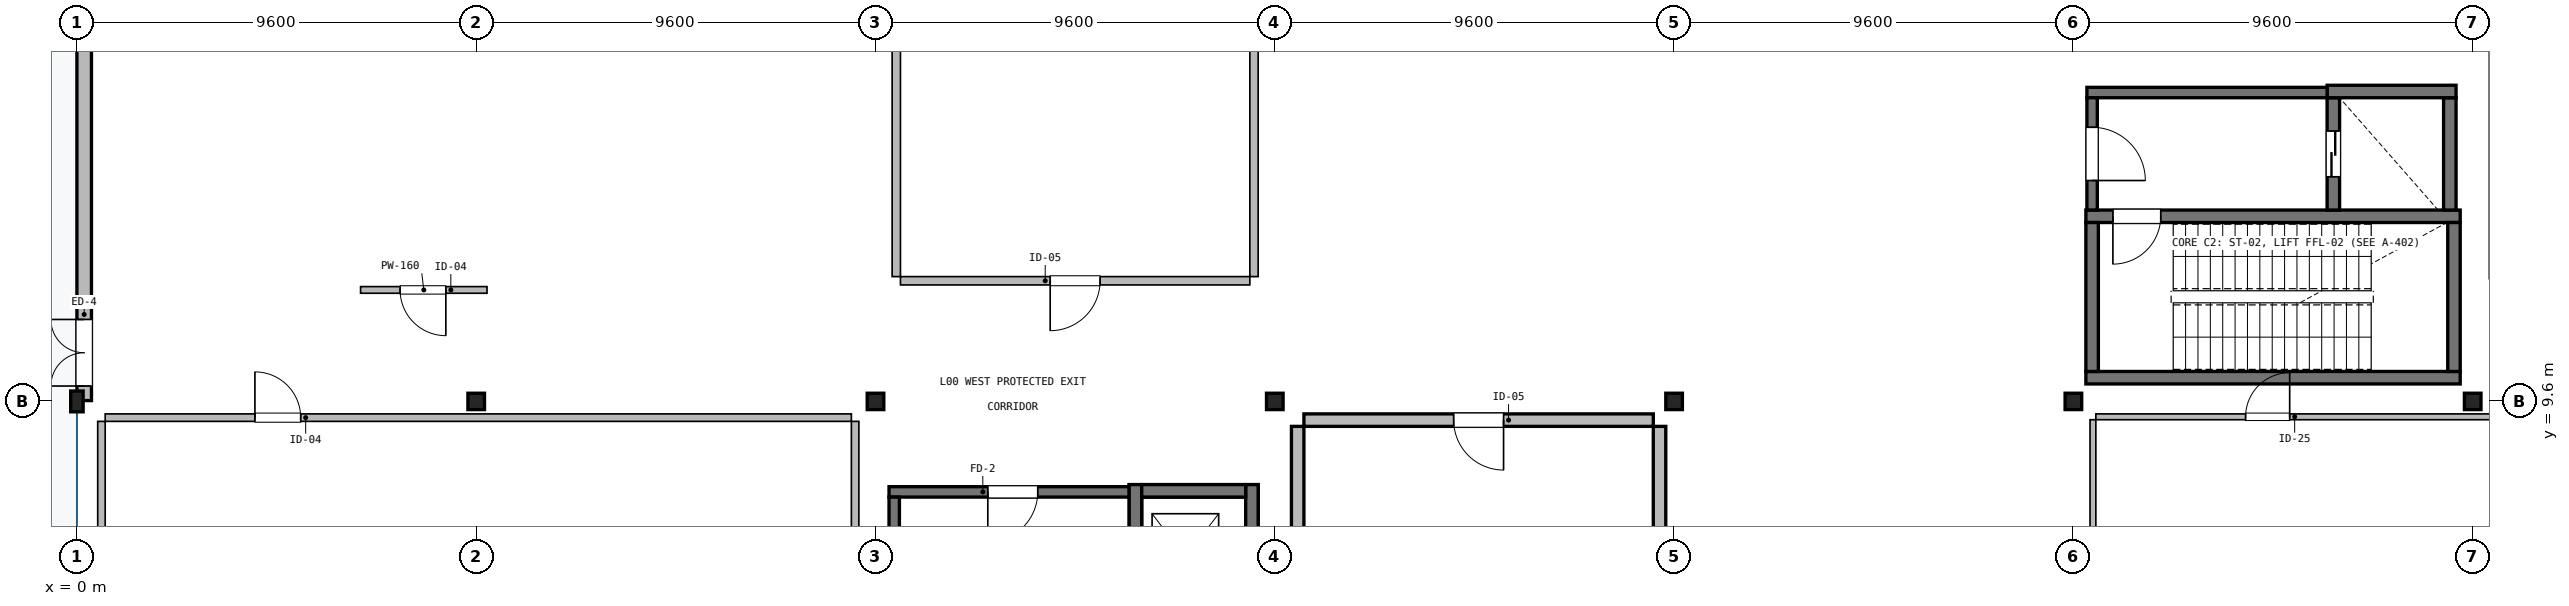
"""IFC4 building model, lengths in metres.
Left out: names, types, materials, properties, quantities, classifications, styles, units other than length and angle.
Written with IfcOpenShell. Run it as: python <this file> out.ifc"""

import sys

from ifc_helpers import new_model, si_unit, direction, frame, frame_2d, origin, origin_2d, place, context, subcontext, project, spatial, rectangle, i_section, extrude, element, fill, save


model = new_model("IFC4")
c1 = context("Model", 3, precision=1e-05, world=origin(), true_north=direction((0.0, 1.0)))
c2 = subcontext(c1, "Body", "Model", "MODEL_VIEW")
j1 = project(units=[si_unit("LENGTHUNIT", "METRE"), si_unit("PLANEANGLEUNIT", "RADIAN")], contexts=[c1])
p1 = place(None, origin())
s1 = spatial("IfcSite", under=j1, at=p1, CompositionType="ELEMENT")
p2 = place(p1, origin())
s2 = spatial("IfcBuilding", under=s1, at=p2, CompositionType="ELEMENT")
p3 = place(p2, origin())
s3 = spatial("IfcBuildingStorey", under=s2, at=p3, CompositionType="ELEMENT", Elevation=0.0)
p4 = place(p3, frame((0.0, 9.6, -0.36), z_axis=(0.0, 0.0, 1.0), x_axis=(1.0, 0.0, 0.0)))
e1 = element("IfcColumn", 1, at=p4, inside=s3, PredefinedType="COLUMN", context=c2, shape_type="SweptSolid", body=[
    extrude(i_section(OverallWidth=0.3, OverallDepth=0.5, WebThickness=0.014, FlangeThickness=0.028, FilletRadius=0.027, at=origin_2d()), origin(), (0.0, 0.0, 1.0), 6.11),
])
for number, where, z_axis, x_axis in (
    (2, (9.6, 9.6, -0.36), (0.0, 0.0, 1.0), (1.0, 0.0, 0.0)),
    (3, (19.2, 9.6, -0.36), (0.0, 0.0, 1.0), (1.0, 0.0, 0.0)),
    (4, (28.8, 9.6, -0.36), (0.0, 0.0, 1.0), (1.0, 0.0, 0.0)),
    (5, (38.4, 9.6, -0.36), (0.0, 0.0, 1.0), (1.0, 0.0, 0.0)),
):
    element("IfcColumn", number, at=place(p3, frame(where, z_axis=z_axis, x_axis=x_axis)), inside=s3, PredefinedType="COLUMN", context=c2, shape_type="SweptSolid", body=[
        extrude(i_section(OverallWidth=0.399, OverallDepth=0.394, WebThickness=0.023, FlangeThickness=0.037, FilletRadius=0.015, at=origin_2d()), origin(), (0.0, 0.0, 1.0), 6.11),
    ])
for number, where, z_axis, x_axis in (
    (6, (48.0, 9.6, 0.0), (0.0, 0.0, 1.0), (1.0, 0.0, 0.0)),
    (7, (57.6, 9.6, 0.0), (0.0, 0.0, 1.0), (1.0, 0.0, 0.0)),
):
    element("IfcColumn", number, at=place(p3, frame(where, z_axis=z_axis, x_axis=x_axis)), inside=s3, PredefinedType="COLUMN", context=c2, shape_type="SweptSolid", body=[
        extrude(i_section(OverallWidth=0.399, OverallDepth=0.394, WebThickness=0.023, FlangeThickness=0.037, FilletRadius=0.015, at=origin_2d()), origin(), (0.0, 0.0, 1.0), 5.75),
    ])
p5 = place(p3, frame((48.3, 10.17, 0.0), z_axis=(0.0, 0.0, 1.0), x_axis=(1.0, 0.0, 0.0)))
e8 = element("IfcWall", 8, at=p5, inside=s3, PredefinedType="SHEAR", context=c2, shape_type="SweptSolid", body=[
    extrude(rectangle(XDim=9.0, YDim=0.3, at=frame_2d((4.5, 0.0))), origin(), (0.0, 0.0, 1.0), 5.75),
])
p6 = place(p3, frame((57.3, 14.05, 0.0), z_axis=(0.0, 0.0, 1.0), x_axis=(-1.0, 0.0, 0.0)))
e9 = element("IfcWall", 9, at=p6, inside=s3, PredefinedType="SHEAR", context=c2, shape_type="SweptSolid", body=[
    extrude(rectangle(XDim=9.0, YDim=0.3, at=frame_2d((4.5, 0.0))), origin(), (0.0, 0.0, 1.0), 5.75),
])
p7 = place(p6, frame((7.2, 0.0, 0.0)))
e10 = element("IfcOpeningElement", 10, at=p7, cuts=e9, PredefinedType="OPENING", context=c2, shape_type="SweptSolid", body=[
    extrude(rectangle(XDim=1.15, YDim=2.15, at=frame_2d((0.575, 1.075))), frame((0.0, 0.16, 0.0), z_axis=(0.0, -1.0, 0.0), x_axis=(1.0, 0.0, 0.0)), (0.0, 0.0, 1.0), 0.32),
])
for number, where, z_axis, x_axis in (
    (11, (48.45, 10.32, 0.0), (0.0, 0.0, 1.0), (0.0, 1.0, 0.0)),
    (12, (57.15, 13.9, 0.0), (0.0, 0.0, 1.0), (0.0, -1.0, 0.0)),
):
    element("IfcWall", number, at=place(p3, frame(where, z_axis=z_axis, x_axis=x_axis)), inside=s3, PredefinedType="SHEAR", context=c2, shape_type="SweptSolid", body=[
        extrude(rectangle(XDim=3.58, YDim=0.3, at=frame_2d((1.79, 0.0))), origin(), (0.0, 0.0, 1.0), 5.75),
    ])
p8 = place(p3, frame((54.25, 16.9, 0.0), z_axis=(0.0, 0.0, 1.0), x_axis=(0.0, -1.0, 0.0)))
e13 = element("IfcWall", 13, at=p8, inside=s3, PredefinedType="SHEAR", context=c2, shape_type="SweptSolid", body=[
    extrude(rectangle(XDim=2.7, YDim=0.3, at=frame_2d((1.35, 0.0))), origin(), (0.0, 0.0, 1.0), 5.75),
])
p9 = place(p8, frame((0.8, 0.0, 0.0)))
e14 = element("IfcOpeningElement", 14, at=p9, cuts=e13, PredefinedType="OPENING", context=c2, shape_type="SweptSolid", body=[
    extrude(rectangle(XDim=1.1, YDim=2.1, at=frame_2d((0.55, 1.05))), frame((0.0, 0.16, 0.0), z_axis=(0.0, -1.0, 0.0), x_axis=(1.0, 0.0, 0.0)), (0.0, 0.0, 1.0), 0.32),
])
p10 = place(p3, frame((57.05, 14.2, 0.0), z_axis=(0.0, 0.0, 1.0), x_axis=(0.0, 1.0, 0.0)))
e15 = element("IfcWall", 15, at=p10, inside=s3, PredefinedType="SHEAR", context=c2, shape_type="SweptSolid", body=[
    extrude(rectangle(XDim=2.7, YDim=0.3, at=frame_2d((1.35, 0.0))), origin(), (0.0, 0.0, 1.0), 5.75),
])
p11 = place(p3, frame((54.1, 17.05, 0.0), z_axis=(0.0, 0.0, 1.0), x_axis=(1.0, 0.0, 0.0)))
e16 = element("IfcWall", 16, at=p11, inside=s3, PredefinedType="SHEAR", context=c2, shape_type="SweptSolid", body=[
    extrude(rectangle(XDim=3.1, YDim=0.3, at=frame_2d((1.55, 0.0))), origin(), (0.0, 0.0, 1.0), 5.75),
])
p12 = place(p3, frame((54.1, 17.025, 0.0), z_axis=(0.0, 0.0, 1.0), x_axis=(-1.0, 0.0, 0.0)))
e17 = element("IfcWall", 17, at=p12, inside=s3, PredefinedType="SHEAR", context=c2, shape_type="SweptSolid", body=[
    extrude(rectangle(XDim=5.775, YDim=0.25, at=frame_2d((2.888, 0.0))), origin(), (0.0, 0.0, 1.0), 5.75),
])
p13 = place(p3, frame((48.45, 14.2, 0.0), z_axis=(0.0, 0.0, 1.0), x_axis=(0.0, 1.0, 0.0)))
e18 = element("IfcWall", 18, at=p13, inside=s3, PredefinedType="SHEAR", context=c2, shape_type="SweptSolid", body=[
    extrude(rectangle(XDim=2.7, YDim=0.25, at=frame_2d((1.35, 0.0))), origin(), (0.0, 0.0, 1.0), 5.75),
])
p14 = place(p13, frame((0.71, 0.0, 0.0)))
e19 = element("IfcOpeningElement", 19, at=p14, cuts=e18, PredefinedType="OPENING", context=c2, shape_type="SweptSolid", body=[
    extrude(rectangle(XDim=1.28, YDim=2.2, at=frame_2d((0.64, 1.1))), frame((0.0, 0.135, 0.0), z_axis=(0.0, -1.0, 0.0), x_axis=(1.0, 0.0, 0.0)), (0.0, 0.0, 1.0), 0.27),
])
p15 = place(p3, frame((25.45, 7.3, 0.0), z_axis=(0.0, 0.0, 1.0), x_axis=(0.0, -1.0, 0.0)))
e20 = element("IfcWall", 20, at=p15, inside=s3, PredefinedType="SHEAR", context=c2, shape_type="SweptSolid", body=[
    extrude(rectangle(XDim=2.7, YDim=0.3, at=frame_2d((1.35, 0.0))), origin(), (0.0, 0.0, 1.0), 5.75),
])
p16 = place(p15, frame((0.775, 0.0, 0.0)))
e21 = element("IfcOpeningElement", 21, at=p16, cuts=e20, PredefinedType="OPENING", context=c2, shape_type="SweptSolid", body=[
    extrude(rectangle(XDim=1.15, YDim=2.1, at=frame_2d((0.575, 1.05))), frame((0.0, 0.16, 0.0), z_axis=(0.0, -1.0, 0.0), x_axis=(1.0, 0.0, 0.0)), (0.0, 0.0, 1.0), 0.32),
])
p17 = place(p3, frame((28.25, 4.6, 0.0), z_axis=(0.0, 0.0, 1.0), x_axis=(0.0, 1.0, 0.0)))
e22 = element("IfcWall", 22, at=p17, inside=s3, PredefinedType="SHEAR", context=c2, shape_type="SweptSolid", body=[
    extrude(rectangle(XDim=2.7, YDim=0.3, at=frame_2d((1.35, 0.0))), origin(), (0.0, 0.0, 1.0), 5.75),
])
p18 = place(p3, frame((25.3, 7.45, 0.0), z_axis=(0.0, 0.0, 1.0), x_axis=(1.0, 0.0, 0.0)))
e23 = element("IfcWall", 23, at=p18, inside=s3, PredefinedType="SHEAR", context=c2, shape_type="SweptSolid", body=[
    extrude(rectangle(XDim=3.1, YDim=0.3, at=frame_2d((1.55, 0.0))), origin(), (0.0, 0.0, 1.0), 5.75),
])
p19 = place(p3, frame((25.3, 7.425, 0.0), z_axis=(0.0, 0.0, 1.0), x_axis=(-1.0, 0.0, 0.0)))
e24 = element("IfcWall", 24, at=p19, inside=s3, PredefinedType="SHEAR", context=c2, shape_type="SweptSolid", body=[
    extrude(rectangle(XDim=5.775, YDim=0.25, at=frame_2d((2.888, 0.0))), origin(), (0.0, 0.0, 1.0), 5.75),
])
p20 = place(p19, frame((2.2, 0.0, 0.0)))
e25 = element("IfcOpeningElement", 25, at=p20, cuts=e24, PredefinedType="OPENING", context=c2, shape_type="SweptSolid", body=[
    extrude(rectangle(XDim=1.2, YDim=2.15, at=frame_2d((0.6, 1.075))), frame((0.0, 0.135, 0.0), z_axis=(0.0, -1.0, 0.0), x_axis=(1.0, 0.0, 0.0)), (0.0, 0.0, 1.0), 0.27),
])
p21 = place(p3, frame((19.65, 4.6, 0.0), z_axis=(0.0, 0.0, 1.0), x_axis=(0.0, 1.0, 0.0)))
e26 = element("IfcWall", 26, at=p21, inside=s3, PredefinedType="SHEAR", context=c2, shape_type="SweptSolid", body=[
    extrude(rectangle(XDim=2.7, YDim=0.25, at=frame_2d((1.35, 0.0))), origin(), (0.0, 0.0, 1.0), 5.75),
])
for number, where, z_axis, x_axis in (
    (27, (25.45, 4.3, -1.2), (0.0, 0.0, 1.0), (0.0, 1.0, 0.0)),
    (28, (28.25, 4.3, -1.2), (0.0, 0.0, 1.0), (0.0, 1.0, 0.0)),
):
    element("IfcWall", number, at=place(p3, frame(where, z_axis=z_axis, x_axis=x_axis)), inside=s3, PredefinedType="SHEAR", context=c2, shape_type="SweptSolid", body=[
        extrude(rectangle(XDim=3.3, YDim=0.3, at=frame_2d((1.65, 0.0))), origin(), (0.0, 0.0, 1.0), 0.82),
    ])
p22 = place(p3, frame((25.6, 7.45, -1.2), z_axis=(0.0, 0.0, 1.0), x_axis=(1.0, 0.0, 0.0)))
e29 = element("IfcWall", 29, at=p22, inside=s3, PredefinedType="SHEAR", context=c2, shape_type="SweptSolid", body=[
    extrude(rectangle(XDim=2.5, YDim=0.3, at=frame_2d((1.25, 0.0))), origin(), (0.0, 0.0, 1.0), 0.82),
])
p23 = place(p3, frame((0.175, 9.62, 0.0), z_axis=(0.0, 0.0, 1.0), x_axis=(0.0, 1.0, 0.0)))
e30 = element("IfcWall", 30, at=p23, inside=s3, PredefinedType="SOLIDWALL", context=c2, shape_type="SweptSolid", body=[
    extrude(rectangle(XDim=9.56, YDim=0.35, at=frame_2d((4.78, 0.0))), origin(), (0.0, 0.0, 1.0), 5.217),
])
p24 = place(p23, frame((0.35, 0.0, 0.0)))
e31 = element("IfcOpeningElement", 31, at=p24, cuts=e30, PredefinedType="OPENING", context=c2, shape_type="SweptSolid", body=[
    extrude(rectangle(XDim=1.6, YDim=2.2, at=frame_2d((0.8, 1.1))), frame((0.0, 0.185, 0.0), z_axis=(0.0, -1.0, 0.0), x_axis=(1.0, 0.0, 0.0)), (0.0, 0.0, 1.0), 0.37),
])
p25 = place(p3, frame((6.82, 12.28, 0.0), z_axis=(0.0, 0.0, 1.0), x_axis=(1.0, 0.0, 0.0)))
e32 = element("IfcWall", 32, at=p25, inside=s3, PredefinedType="PARTITIONING", context=c2, shape_type="SweptSolid", body=[
    extrude(rectangle(XDim=3.04, YDim=0.16, at=frame_2d((1.52, 0.0))), origin(), (0.0, 0.0, 1.0), 5.207),
])
p26 = place(p25, frame((0.95, 0.0, 0.0)))
e33 = element("IfcOpeningElement", 33, at=p26, cuts=e32, PredefinedType="OPENING", context=c2, shape_type="SweptSolid", body=[
    extrude(rectangle(XDim=1.1, YDim=2.2, at=frame_2d((0.55, 1.1))), frame((0.0, 0.09, 0.0), z_axis=(0.0, -1.0, 0.0), x_axis=(1.0, 0.0, 0.0)), (0.0, 0.0, 1.0), 0.18),
])
p27 = place(p3, frame((29.5, 9.15, 0.0), z_axis=(0.0, 0.0, 1.0), x_axis=(1.0, 0.0, 0.0)))
e34 = element("IfcWall", 34, at=p27, inside=s3, PredefinedType="SHEAR", context=c2, shape_type="SweptSolid", body=[
    extrude(rectangle(XDim=8.4, YDim=0.3, at=frame_2d((4.2, 0.0))), origin(), (0.0, 0.0, 1.0), 5.39),
])
p28 = place(p27, frame((3.6, 0.0, 0.0)))
e35 = element("IfcOpeningElement", 35, at=p28, cuts=e34, PredefinedType="OPENING", context=c2, shape_type="SweptSolid", body=[
    extrude(rectangle(XDim=1.2, YDim=2.2, at=frame_2d((0.6, 1.1))), frame((0.0, 0.16, 0.0), z_axis=(0.0, -1.0, 0.0), x_axis=(1.0, 0.0, 0.0)), (0.0, 0.0, 1.0), 0.32),
])
for number, where, z_axis, x_axis in (
    (36, (29.35, 0.8, 0.0), (0.0, 0.0, 1.0), (0.0, 1.0, 0.0)),
    (37, (38.05, 9.0, 0.0), (0.0, 0.0, 1.0), (0.0, -1.0, 0.0)),
):
    element("IfcWall", number, at=place(p3, frame(where, z_axis=z_axis, x_axis=x_axis)), inside=s3, PredefinedType="SHEAR", context=c2, shape_type="SweptSolid", body=[
        extrude(rectangle(XDim=8.2, YDim=0.3, at=frame_2d((4.1, 0.0))), origin(), (0.0, 0.0, 1.0), 5.39),
    ])
p29 = place(p3, frame((0.68, 9.21, 0.0), z_axis=(0.0, 0.0, 1.0), x_axis=(1.0, 0.0, 0.0)))
e38 = element("IfcWall", 38, at=p29, inside=s3, PredefinedType="PARTITIONING", context=c2, shape_type="SweptSolid", body=[
    extrude(rectangle(XDim=17.94, YDim=0.18, at=frame_2d((8.97, 0.0))), origin(), (0.0, 0.0, 1.0), 5.207),
])
p30 = place(p29, frame((3.6, 0.0, 0.0)))
e39 = element("IfcOpeningElement", 39, at=p30, cuts=e38, PredefinedType="OPENING", context=c2, shape_type="SweptSolid", body=[
    extrude(rectangle(XDim=1.1, YDim=2.2, at=frame_2d((0.55, 1.1))), frame((0.0, 0.1, 0.0), z_axis=(0.0, -1.0, 0.0), x_axis=(1.0, 0.0, 0.0)), (0.0, 0.0, 1.0), 0.2),
])
for number, where, z_axis, x_axis in (
    (40, (0.59, 0.68, 0.0), (0.0, 0.0, 1.0), (0.0, 1.0, 0.0)),
    (41, (18.71, 9.12, 0.0), (0.0, 0.0, 1.0), (0.0, -1.0, 0.0)),
):
    element("IfcWall", number, at=place(p3, frame(where, z_axis=z_axis, x_axis=x_axis)), inside=s3, PredefinedType="PARTITIONING", context=c2, shape_type="SweptSolid", body=[
        extrude(rectangle(XDim=8.44, YDim=0.18, at=frame_2d((4.22, 0.0))), origin(), (0.0, 0.0, 1.0), 5.39),
    ])
p31 = place(p3, frame((48.54, 9.23, 0.0), z_axis=(0.0, 0.0, 1.0), x_axis=(1.0, 0.0, 0.0)))
e42 = element("IfcWall", 42, at=p31, inside=s3, PredefinedType="PARTITIONING", context=c2, shape_type="SweptSolid", body=[
    extrude(rectangle(XDim=18.12, YDim=0.14, at=frame_2d((9.06, 0.0))), origin(), (0.0, 0.0, 1.0), 5.207),
])
p32 = place(p31, frame((3.6, 0.0, 0.0)))
e43 = element("IfcOpeningElement", 43, at=p32, cuts=e42, PredefinedType="OPENING", context=c2, shape_type="SweptSolid", body=[
    extrude(rectangle(XDim=1.06, YDim=2.2, at=frame_2d((0.53, 1.1))), frame((0.0, 0.08, 0.0), z_axis=(0.0, -1.0, 0.0), x_axis=(1.0, 0.0, 0.0)), (0.0, 0.0, 1.0), 0.16),
])
p33 = place(p3, frame((48.47, 0.64, 0.0), z_axis=(0.0, 0.0, 1.0), x_axis=(0.0, 1.0, 0.0)))
e44 = element("IfcWall", 44, at=p33, inside=s3, PredefinedType="PARTITIONING", context=c2, shape_type="SweptSolid", body=[
    extrude(rectangle(XDim=8.52, YDim=0.14, at=frame_2d((4.26, 0.0))), origin(), (0.0, 0.0, 1.0), 5.39),
])
p34 = place(p3, frame((28.2, 12.5, 0.0), z_axis=(0.0, 0.0, 1.0), x_axis=(-1.0, 0.0, 0.0)))
e45 = element("IfcWall", 45, at=p34, inside=s3, PredefinedType="PARTITIONING", context=c2, shape_type="SweptSolid", body=[
    extrude(rectangle(XDim=8.4, YDim=0.2, at=frame_2d((4.2, 0.0))), origin(), (0.0, 0.0, 1.0), 5.39),
])
p35 = place(p34, frame((3.6, 0.0, 0.0)))
e46 = element("IfcOpeningElement", 46, at=p35, cuts=e45, PredefinedType="OPENING", context=c2, shape_type="SweptSolid", body=[
    extrude(rectangle(XDim=1.2, YDim=2.2, at=frame_2d((0.6, 1.1))), frame((0.0, 0.11, 0.0), z_axis=(0.0, -1.0, 0.0), x_axis=(1.0, 0.0, 0.0)), (0.0, 0.0, 1.0), 0.22),
])
for number, where, z_axis, x_axis in (
    (47, (19.7, 12.6, 0.0), (0.0, 0.0, 1.0), (0.0, 1.0, 0.0)),
    (48, (28.3, 37.8, 0.0), (0.0, 0.0, 1.0), (0.0, -1.0, 0.0)),
):
    element("IfcWall", number, at=place(p3, frame(where, z_axis=z_axis, x_axis=x_axis)), inside=s3, PredefinedType="PARTITIONING", context=c2, shape_type="SweptSolid", body=[
        extrude(rectangle(XDim=25.2, YDim=0.2, at=frame_2d((12.6, 0.0))), origin(), (0.0, 0.0, 1.0), 5.056),
    ])
p36 = place(p7, origin())
e49 = element("IfcDoor", 49, at=p36, inside=s3, OperationType="SINGLE_SWING_RIGHT", PredefinedType="DOOR", context=c2, shape_type="SweptSolid", body=[
    extrude(rectangle(XDim=1.15, YDim=2.15, at=frame_2d((0.575, 1.075))), frame((0.0, 0.025, 0.0), z_axis=(0.0, -1.0, 0.0), x_axis=(1.0, 0.0, 0.0)), (0.0, 0.0, 1.0), 0.05),
])
fill(e10, e49)
p37 = place(p9, frame((1.1, 0.0, 0.0), z_axis=(0.0, 0.0, 1.0), x_axis=(-1.0, 0.0, 0.0)))
e50 = element("IfcDoor", 50, at=p37, inside=s3, OperationType="DOUBLE_DOOR_SLIDING", PredefinedType="DOOR", context=c2, shape_type="SweptSolid", body=[
    extrude(rectangle(XDim=1.1, YDim=2.1, at=frame_2d((0.55, 1.05))), frame((0.0, 0.025, 0.0), z_axis=(0.0, -1.0, 0.0), x_axis=(1.0, 0.0, 0.0)), (0.0, 0.0, 1.0), 0.05),
])
fill(e14, e50)
p38 = place(p14, frame((1.28, 0.0, 0.0), z_axis=(0.0, 0.0, 1.0), x_axis=(-1.0, 0.0, 0.0)))
e51 = element("IfcDoor", 51, at=p38, inside=s3, OperationType="SINGLE_SWING_LEFT", PredefinedType="DOOR", context=c2, shape_type="SweptSolid", body=[
    extrude(rectangle(XDim=1.28, YDim=2.2, at=frame_2d((0.64, 1.1))), frame((0.0, 0.025, 0.0), z_axis=(0.0, -1.0, 0.0), x_axis=(1.0, 0.0, 0.0)), (0.0, 0.0, 1.0), 0.05),
])
fill(e19, e51)
p39 = place(p20, origin())
e52 = element("IfcDoor", 52, at=p39, inside=s3, OperationType="SINGLE_SWING_RIGHT", PredefinedType="DOOR", context=c2, shape_type="SweptSolid", body=[
    extrude(rectangle(XDim=1.2, YDim=2.15, at=frame_2d((0.6, 1.075))), frame((0.0, 0.025, 0.0), z_axis=(0.0, -1.0, 0.0), x_axis=(1.0, 0.0, 0.0)), (0.0, 0.0, 1.0), 0.05),
])
fill(e25, e52)
p40 = place(p24, origin())
e53 = element("IfcDoor", 53, at=p40, inside=s3, OperationType="DOUBLE_DOOR_SINGLE_SWING", PredefinedType="DOOR", context=c2, shape_type="SweptSolid", body=[
    extrude(rectangle(XDim=1.6, YDim=2.2, at=frame_2d((0.8, 1.1))), frame((0.0, 0.025, 0.0), z_axis=(0.0, -1.0, 0.0), x_axis=(1.0, 0.0, 0.0)), (0.0, 0.0, 1.0), 0.05),
])
fill(e31, e53)
p41 = place(p26, frame((1.1, 0.0, 0.0), z_axis=(0.0, 0.0, 1.0), x_axis=(-1.0, 0.0, 0.0)))
e54 = element("IfcDoor", 54, at=p41, inside=s3, OperationType="SINGLE_SWING_RIGHT", PredefinedType="DOOR", context=c2, shape_type="SweptSolid", body=[
    extrude(rectangle(XDim=1.1, YDim=2.2, at=frame_2d((0.55, 1.1))), frame((0.0, 0.025, 0.0), z_axis=(0.0, -1.0, 0.0), x_axis=(1.0, 0.0, 0.0)), (0.0, 0.0, 1.0), 0.05),
])
fill(e33, e54)
p42 = place(p28, frame((1.2, 0.0, 0.0), z_axis=(0.0, 0.0, 1.0), x_axis=(-1.0, 0.0, 0.0)))
e55 = element("IfcDoor", 55, at=p42, inside=s3, OperationType="SINGLE_SWING_RIGHT", PredefinedType="DOOR", context=c2, shape_type="SweptSolid", body=[
    extrude(rectangle(XDim=1.2, YDim=2.2, at=frame_2d((0.6, 1.1))), frame((0.0, 0.025, 0.0), z_axis=(0.0, -1.0, 0.0), x_axis=(1.0, 0.0, 0.0)), (0.0, 0.0, 1.0), 0.05),
])
fill(e35, e55)
p43 = place(p30, origin())
e56 = element("IfcDoor", 56, at=p43, inside=s3, OperationType="SINGLE_SWING_LEFT", PredefinedType="DOOR", context=c2, shape_type="SweptSolid", body=[
    extrude(rectangle(XDim=1.1, YDim=2.2, at=frame_2d((0.55, 1.1))), frame((0.0, 0.025, 0.0), z_axis=(0.0, -1.0, 0.0), x_axis=(1.0, 0.0, 0.0)), (0.0, 0.0, 1.0), 0.05),
])
fill(e39, e56)
p44 = place(p32, origin())
e57 = element("IfcDoor", 57, at=p44, inside=s3, OperationType="SINGLE_SWING_RIGHT", PredefinedType="DOOR", context=c2, shape_type="SweptSolid", body=[
    extrude(rectangle(XDim=1.06, YDim=2.2, at=frame_2d((0.53, 1.1))), frame((0.0, 0.025, 0.0), z_axis=(0.0, -1.0, 0.0), x_axis=(1.0, 0.0, 0.0)), (0.0, 0.0, 1.0), 0.05),
])
fill(e43, e57)
p45 = place(p35, origin())
e58 = element("IfcDoor", 58, at=p45, inside=s3, OperationType="SINGLE_SWING_RIGHT", PredefinedType="DOOR", context=c2, shape_type="SweptSolid", body=[
    extrude(rectangle(XDim=1.2, YDim=2.2, at=frame_2d((0.6, 1.1))), frame((0.0, 0.025, 0.0), z_axis=(0.0, -1.0, 0.0), x_axis=(1.0, 0.0, 0.0)), (0.0, 0.0, 1.0), 0.05),
])
fill(e46, e58)
save(model, sys.argv[1])
